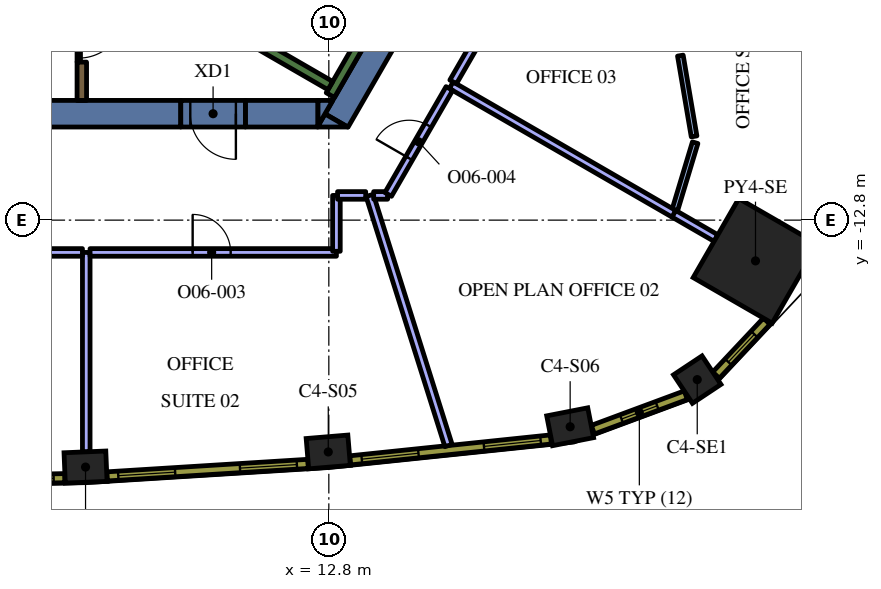
"""IFC4 building model, lengths in metres.
Left out: names, types, materials, properties, quantities, classifications, styles, units other than length and angle.
Written with IfcOpenShell. Run it as: python <this file> out.ifc"""

import sys

from ifc_helpers import new_model, si_unit, direction, frame, frame_2d, origin, origin_2d, place, context, subcontext, project, spatial, polyline, rectangle, outline, extrude, element, fill, save


model = new_model("IFC4")
c1 = context("Model", 3, precision=1e-05, world=origin(), true_north=direction((0.0, 1.0)))
c2 = subcontext(c1, "Body", "Model", "MODEL_VIEW")
j1 = project(units=[si_unit("LENGTHUNIT", "METRE"), si_unit("PLANEANGLEUNIT", "RADIAN")], contexts=[c1])
p1 = place(None, origin())
s1 = spatial("IfcSite", under=j1, at=p1, CompositionType="ELEMENT")
p2 = place(p1, origin())
s2 = spatial("IfcBuilding", under=s1, at=p2, CompositionType="ELEMENT")
p3 = place(p2, frame((0.0, 0.0, 210.0)))
s3 = spatial("IfcBuildingStorey", under=s2, at=p3, CompositionType="ELEMENT", Elevation=210.0)
p4 = place(p3, frame((24.027, -13.872, 0.0), z_axis=(0.0, 0.0, 1.0), x_axis=(0.866025403784, -0.5, 0.0)))
e1 = element("IfcColumn", 1, at=p4, inside=s3, PredefinedType="COLUMN", context=c2, shape_type="SweptSolid", body=[
    extrude(rectangle(XDim=2.4, YDim=2.4, at=origin_2d()), origin(), (0.0, 0.0, 1.0), 4.2),
])
for number, where, z_axis, x_axis in (
    (2, (6.398, -19.298, 0.0), (0.0, 0.0, 1.0), (0.999, 0.041, 0.0)),
    (3, (12.785, -18.9, 0.0), (0.0, 0.0, 1.0), (0.997, 0.083, 0.0)),
    (4, (19.15, -18.237, 0.0), (0.0, 0.0, 1.0), (0.981, 0.192, 0.0)),
):
    element("IfcColumn", number, at=place(p3, frame(where, z_axis=z_axis, x_axis=x_axis)), inside=s3, PredefinedType="COLUMN", context=c2, shape_type="SweptSolid", body=[
        extrude(rectangle(XDim=1.1, YDim=0.8, at=origin_2d()), origin(), (0.0, 0.0, 1.0), 4.2),
    ])
p5 = place(p3, frame((22.494, -16.997, 0.0), z_axis=(0.0, 0.0, 1.0), x_axis=(0.833238868178, 0.552913183563, 0.0)))
e5 = element("IfcColumn", 5, at=p5, inside=s3, PredefinedType="COLUMN", context=c2, shape_type="SweptSolid", body=[
    extrude(rectangle(XDim=0.9, YDim=0.9, at=origin_2d()), origin(), (0.0, 0.0, 1.0), 4.2),
])
p6 = place(p3, frame((13.003, -10.179, 0.0), z_axis=(0.0, 0.0, 1.0), x_axis=(0.499972675833, 0.866041178825, 0.0)))
e6 = element("IfcWall", 6, at=p6, inside=s3, PredefinedType="SOLIDWALL", context=c2, shape_type="SweptSolid", body=[
    extrude(rectangle(XDim=3.829, YDim=0.7, at=frame_2d((1.915, 0.0))), origin(), (0.0, 0.0, 1.0), 4.2),
])
p7 = place(p3, origin())
e7 = element("IfcWall", 7, at=p7, inside=s3, PredefinedType="SOLIDWALL", context=c2, shape_type="SweptSolid", body=[
    extrude(outline(polyline([(12.698, -10.005), (13.296, -10.35), (12.5, -10.35), (12.698, -10.005)])), origin(), (0.0, 0.0, 1.0), 4.2),
])
p8 = place(p3, frame((10.604, -10.0, 0.0), z_axis=(0.0, 0.0, 1.0), x_axis=(1.0, 0.0, 0.0)))
e8 = element("IfcWall", 8, at=p8, inside=s3, PredefinedType="SOLIDWALL", context=c2, shape_type="SweptSolid", body=[
    extrude(rectangle(XDim=1.909, YDim=0.7, at=frame_2d((0.955, 0.0))), origin(), (0.0, 0.0, 1.0), 4.2),
])
e9 = element("IfcWall", 9, at=p7, inside=s3, PredefinedType="SOLIDWALL", context=c2, shape_type="SweptSolid", body=[
    extrude(outline(polyline([(12.904, -9.65), (12.516, -10.322), (12.516, -9.65), (12.904, -9.65)])), origin(), (0.0, 0.0, 1.0), 4.2),
])
p9 = place(p3, frame((-10.556, -10.0, 0.0), z_axis=(0.0, 0.0, 1.0), x_axis=(1.0, 0.0, 0.0)))
e10 = element("IfcWall", 10, at=p9, inside=s3, PredefinedType="SOLIDWALL", context=c2, shape_type="SweptSolid", body=[
    extrude(rectangle(XDim=19.461, YDim=0.7, at=frame_2d((9.73, 0.0))), origin(), (0.0, 0.0, 1.0), 4.2),
])
p10 = place(p3, frame((12.84, -9.511, 0.0), z_axis=(0.0, 0.0, 1.0), x_axis=(0.500048121057, 0.865997619297, 0.0)))
e11 = element("IfcWall", 11, at=p10, inside=s3, PredefinedType="SOLIDWALL", context=c2, shape_type="SweptSolid", body=[
    extrude(rectangle(XDim=3.634, YDim=0.25, at=frame_2d((1.817, 0.0))), origin(), (0.0, 0.0, 1.0), 4.2),
])
p11 = place(p3, frame((12.84, -9.261, 0.0), z_axis=(0.0, 0.0, 1.0), x_axis=(-0.866013990052, 0.500019768644, 0.0)))
e12 = element("IfcWall", 12, at=p11, inside=s3, PredefinedType="SOLIDWALL", context=c2, shape_type="SweptSolid", body=[
    extrude(rectangle(XDim=6.8, YDim=0.25, at=frame_2d((3.4, 0.0))), origin(), (0.0, 0.0, 1.0), 4.2),
])
p12 = place(p3, frame((6.3, -9.65, 0.0), z_axis=(0.0, 0.0, 1.0), x_axis=(0.0, 1.0, 0.0)))
e13 = element("IfcWall", 13, at=p12, inside=s3, PredefinedType="SOLIDWALL", context=c2, shape_type="SweptSolid", body=[
    extrude(rectangle(XDim=1.008, YDim=0.25, at=frame_2d((0.504, 0.0))), origin(), (0.0, 0.0, 1.0), 4.2),
])
p13 = place(p3, frame((6.22, -7.237, 0.0), z_axis=(0.0, 0.0, 1.0), x_axis=(0.0, -1.0, 0.0)))
e14 = element("IfcWall", 14, at=p13, inside=s3, PredefinedType="PARTITIONING", context=c2, shape_type="SweptSolid", body=[
    extrude(rectangle(XDim=1.4, YDim=0.09, at=frame_2d((0.7, 0.0))), origin(), (0.0, 0.0, 1.0), 3.45),
])
p14 = place(p13, frame((0.1, 0.0, 0.0)))
e15 = element("IfcOpeningElement", 15, at=p14, cuts=e14, PredefinedType="OPENING", context=c2, shape_type="SweptSolid", body=[
    extrude(rectangle(XDim=1.2, YDim=2.1, at=frame_2d((0.6, 1.05))), frame((0.0, 0.055, 0.0), z_axis=(0.0, -1.0, 0.0), x_axis=(1.0, 0.0, 0.0)), (0.0, 0.0, 1.0), 0.11),
])
p15 = place(p3, frame((10.604, -10.0, 0.0), z_axis=(0.0, 0.0, 1.0), x_axis=(-1.0, 0.0, 0.0)))
e16 = element("IfcWall", 16, at=p15, inside=s3, PredefinedType="SOLIDWALL", context=c2, shape_type="SweptSolid", body=[
    extrude(rectangle(XDim=1.7, YDim=0.7, at=frame_2d((0.85, 0.0))), origin(), (0.0, 0.0, 1.0), 4.2),
])
p16 = place(p15, frame((0.25, 0.0, 0.0)))
e17 = element("IfcOpeningElement", 17, at=p16, cuts=e16, PredefinedType="OPENING", context=c2, shape_type="SweptSolid", body=[
    extrude(rectangle(XDim=1.2, YDim=2.1, at=frame_2d((0.6, 1.05))), frame((0.0, 0.36, 0.0), z_axis=(0.0, -1.0, 0.0), x_axis=(1.0, 0.0, 0.0)), (0.0, 0.0, 1.0), 0.72),
])
p17 = place(p3, frame((6.417, -13.65, 0.0), z_axis=(0.0, 0.0, 1.0), x_axis=(0.0, -1.0, 0.0)))
e18 = element("IfcWall", 18, at=p17, inside=s3, PredefinedType="PARTITIONING", context=c2, shape_type="SweptSolid", body=[
    extrude(rectangle(XDim=5.247, YDim=0.2, at=frame_2d((2.624, 0.0))), origin(), (0.0, 0.0, 1.0), 3.45),
])
p18 = place(p3, frame((-6.317, -13.65, 0.0), z_axis=(0.0, 0.0, 1.0), x_axis=(1.0, 0.0, 0.0)))
e19 = element("IfcWall", 19, at=p18, inside=s3, PredefinedType="PARTITIONING", context=c2, shape_type="SweptSolid", body=[
    extrude(rectangle(XDim=12.634, YDim=0.2, at=frame_2d((6.317, 0.0))), origin(), (0.0, 0.0, 1.0), 3.45),
])
p19 = place(p18, frame((5.8, 0.0, 0.0)))
e20 = element("IfcOpeningElement", 20, at=p19, cuts=e19, PredefinedType="OPENING", context=c2, shape_type="SweptSolid", body=[
    extrude(rectangle(XDim=1.0, YDim=2.1, at=frame_2d((0.5, 1.05))), frame((0.0, 0.11, 0.0), z_axis=(0.0, -1.0, 0.0), x_axis=(1.0, 0.0, 0.0)), (0.0, 0.0, 1.0), 0.22),
])
p20 = place(p3, frame((13.875, -12.15, 0.0), z_axis=(0.0, 0.0, 1.0), x_axis=(0.3005606746, -0.953762696316, 0.0)))
e21 = element("IfcWall", 21, at=p20, inside=s3, PredefinedType="PARTITIONING", context=c2, shape_type="SweptSolid", body=[
    extrude(rectangle(XDim=6.9, YDim=0.2, at=frame_2d((3.45, 0.0))), origin(), (0.0, 0.0, 1.0), 3.45),
])
p21 = place(p3, frame((6.517, -13.65, 0.0), z_axis=(0.0, 0.0, 1.0), x_axis=(1.0, 0.0, 0.0)))
e22 = element("IfcWall", 22, at=p21, inside=s3, PredefinedType="PARTITIONING", context=c2, shape_type="SweptSolid", body=[
    extrude(rectangle(XDim=6.483, YDim=0.2, at=frame_2d((3.242, 0.0))), origin(), (0.0, 0.0, 1.0), 3.45),
])
p22 = place(p21, frame((2.7, 0.0, 0.0)))
e23 = element("IfcOpeningElement", 23, at=p22, cuts=e22, PredefinedType="OPENING", context=c2, shape_type="SweptSolid", body=[
    extrude(rectangle(XDim=1.0, YDim=2.1, at=frame_2d((0.5, 1.05))), frame((0.0, 0.11, 0.0), z_axis=(0.0, -1.0, 0.0), x_axis=(1.0, 0.0, 0.0)), (0.0, 0.0, 1.0), 0.22),
])
p23 = place(p3, frame((13.0, -13.62, 0.0), z_axis=(0.0, 0.0, 1.0), x_axis=(0.0, 1.0, 0.0)))
e24 = element("IfcWall", 24, at=p23, inside=s3, PredefinedType="PARTITIONING", context=c2, shape_type="SweptSolid", body=[
    extrude(rectangle(XDim=1.47, YDim=0.2, at=frame_2d((0.735, 0.0))), origin(), (0.0, 0.0, 1.0), 3.45),
])
p24 = place(p3, frame((13.03, -12.15, 0.0), z_axis=(0.0, 0.0, 1.0), x_axis=(1.0, 0.0, 0.0)))
e25 = element("IfcWall", 25, at=p24, inside=s3, PredefinedType="PARTITIONING", context=c2, shape_type="SweptSolid", body=[
    extrude(rectangle(XDim=0.74, YDim=0.2, at=frame_2d((0.37, 0.0))), origin(), (0.0, 0.0, 1.0), 3.45),
])
p25 = place(p3, frame((21.873, -12.628, 0.0), z_axis=(0.0, 0.0, 1.0), x_axis=(0.866052988967, -0.499952218018, 0.0)))
e26 = element("IfcWall", 26, at=p25, inside=s3, PredefinedType="PARTITIONING", context=c2, shape_type="SweptSolid", body=[
    extrude(rectangle(XDim=1.288, YDim=0.2, at=frame_2d((0.644, 0.0))), origin(), (0.0, 0.0, 1.0), 3.45),
])
p26 = place(p3, frame((16.021, -9.25, 0.0), z_axis=(0.0, 0.0, 1.0), x_axis=(0.86602692059, -0.499997372806, 0.0)))
e27 = element("IfcWall", 27, at=p26, inside=s3, PredefinedType="PARTITIONING", context=c2, shape_type="SweptSolid", body=[
    extrude(rectangle(XDim=6.765, YDim=0.2, at=frame_2d((3.382, 0.0))), origin(), (0.0, 0.0, 1.0), 3.45),
])
p27 = place(p3, frame((13.98, -12.15, 0.0), z_axis=(0.0, 0.0, 1.0), x_axis=(1.0, 0.0, 0.0)))
e28 = element("IfcWall", 28, at=p27, inside=s3, PredefinedType="PARTITIONING", context=c2, shape_type="SweptSolid", body=[
    extrude(rectangle(XDim=0.367, YDim=0.2, at=frame_2d((0.184, 0.0))), origin(), (0.0, 0.0, 1.0), 3.45),
])
p28 = place(p3, frame((14.362, -12.124, 0.0), z_axis=(0.0, 0.0, 1.0), x_axis=(0.500022299258, 0.866012528919, 0.0)))
e29 = element("IfcWall", 29, at=p28, inside=s3, PredefinedType="PARTITIONING", context=c2, shape_type="SweptSolid", body=[
    extrude(rectangle(XDim=3.219, YDim=0.2, at=frame_2d((1.609, 0.0))), origin(), (0.0, 0.0, 1.0), 3.45),
])
p29 = place(p28, frame((1.1, 0.0, 0.0)))
e30 = element("IfcOpeningElement", 30, at=p29, cuts=e29, PredefinedType="OPENING", context=c2, shape_type="SweptSolid", body=[
    extrude(rectangle(XDim=1.0, YDim=2.1, at=frame_2d((0.5, 1.05))), frame((0.0, 0.11, 0.0), z_axis=(0.0, -1.0, 0.0), x_axis=(1.0, 0.0, 0.0)), (0.0, 0.0, 1.0), 0.22),
])
p30 = place(p3, frame((21.906, -12.532, 0.0), z_axis=(0.0, 0.0, 1.0), x_axis=(0.288789848591, 0.957392512688, 0.0)))
e31 = element("IfcWall", 31, at=p30, inside=s3, PredefinedType="PARTITIONING", context=c2, shape_type="SweptSolid", body=[
    extrude(rectangle(XDim=1.848, YDim=0.15, at=frame_2d((0.924, 0.0))), origin(), (0.0, 0.0, 1.0), 3.45),
])
p31 = place(p3, frame((22.412, -10.597, 0.0), z_axis=(0.0, 0.0, 1.0), x_axis=(-0.167612004459, 0.985853039738, 0.0)))
e32 = element("IfcWall", 32, at=p31, inside=s3, PredefinedType="PARTITIONING", context=c2, shape_type="SweptSolid", body=[
    extrude(rectangle(XDim=2.156, YDim=0.15, at=frame_2d((1.078, 0.0))), origin(), (0.0, 0.0, 1.0), 3.45),
])
p32 = place(p3, frame((16.072, -9.163, 0.0), z_axis=(0.0, 0.0, 1.0), x_axis=(0.500010870188, 0.866019127788, 0.0)))
e33 = element("IfcWall", 33, at=p32, inside=s3, PredefinedType="PARTITIONING", context=c2, shape_type="SweptSolid", body=[
    extrude(rectangle(XDim=3.249, YDim=0.2, at=frame_2d((1.624, 0.0))), origin(), (0.0, 0.0, 1.0), 3.45),
])
p33 = place(p3, frame((0.556, -19.699, 0.0), z_axis=(0.0, 0.0, 1.0), x_axis=(0.999784035184, 0.020781794712, 0.0)))
e34 = element("IfcWall", 34, at=p33, inside=s3, PredefinedType="SOLIDWALL", context=c2, shape_type="SweptSolid", body=[
    extrude(rectangle(XDim=5.298, YDim=0.24, at=frame_2d((2.649, 0.0))), origin(), (0.0, 0.0, 1.0), 3.95),
])
p34 = place(p33, frame((0.294, 0.0, 0.9)))
e35 = element("IfcOpeningElement", 35, at=p34, cuts=e34, PredefinedType="OPENING", context=c2, shape_type="SweptSolid", body=[
    extrude(rectangle(XDim=1.5, YDim=2.55, at=frame_2d((0.75, 1.275))), frame((0.0, 0.13, 0.0), z_axis=(0.0, -1.0, 0.0), x_axis=(1.0, 0.0, 0.0)), (0.0, 0.0, 1.0), 0.26),
])
p35 = place(p33, frame((3.504, 0.0, 0.9)))
e36 = element("IfcOpeningElement", 36, at=p35, cuts=e34, PredefinedType="OPENING", context=c2, shape_type="SweptSolid", body=[
    extrude(rectangle(XDim=1.5, YDim=2.55, at=frame_2d((0.75, 1.275))), frame((0.0, 0.13, 0.0), z_axis=(0.0, -1.0, 0.0), x_axis=(1.0, 0.0, 0.0)), (0.0, 0.0, 1.0), 0.26),
])
p36 = place(p3, frame((6.965, -19.543, 0.0), z_axis=(0.0, 0.0, 1.0), x_axis=(0.9980633213, 0.062206162685, 0.0)))
e37 = element("IfcWall", 37, at=p36, inside=s3, PredefinedType="SOLIDWALL", context=c2, shape_type="SweptSolid", body=[
    extrude(rectangle(XDim=5.298, YDim=0.24, at=frame_2d((2.649, 0.0))), origin(), (0.0, 0.0, 1.0), 3.95),
])
p37 = place(p36, frame((0.295, 0.0, 0.9)))
e38 = element("IfcOpeningElement", 38, at=p37, cuts=e37, PredefinedType="OPENING", context=c2, shape_type="SweptSolid", body=[
    extrude(rectangle(XDim=1.5, YDim=2.55, at=frame_2d((0.75, 1.275))), frame((0.0, 0.13, 0.0), z_axis=(0.0, -1.0, 0.0), x_axis=(1.0, 0.0, 0.0)), (0.0, 0.0, 1.0), 0.26),
])
p38 = place(p36, frame((3.504, 0.0, 0.9)))
e39 = element("IfcOpeningElement", 39, at=p38, cuts=e37, PredefinedType="OPENING", context=c2, shape_type="SweptSolid", body=[
    extrude(rectangle(XDim=1.5, YDim=2.55, at=frame_2d((0.75, 1.275))), frame((0.0, 0.13, 0.0), z_axis=(0.0, -1.0, 0.0), x_axis=(1.0, 0.0, 0.0)), (0.0, 0.0, 1.0), 0.26),
])
p39 = place(p3, frame((13.362, -19.121, 0.0), z_axis=(0.0, 0.0, 1.0), x_axis=(0.994621961215, 0.103571976272, 0.0)))
e40 = element("IfcWall", 40, at=p39, inside=s3, PredefinedType="SOLIDWALL", context=c2, shape_type="SweptSolid", body=[
    extrude(rectangle(XDim=5.311, YDim=0.24, at=frame_2d((2.655, 0.0))), origin(), (0.0, 0.0, 1.0), 3.95),
])
p40 = place(p39, frame((0.306, 0.0, 0.9)))
e41 = element("IfcOpeningElement", 41, at=p40, cuts=e40, PredefinedType="OPENING", context=c2, shape_type="SweptSolid", body=[
    extrude(rectangle(XDim=1.5, YDim=2.55, at=frame_2d((0.75, 1.275))), frame((0.0, 0.13, 0.0), z_axis=(0.0, -1.0, 0.0), x_axis=(1.0, 0.0, 0.0)), (0.0, 0.0, 1.0), 0.26),
])
p41 = place(p39, frame((3.539, 0.0, 0.9)))
e42 = element("IfcOpeningElement", 42, at=p41, cuts=e40, PredefinedType="OPENING", context=c2, shape_type="SweptSolid", body=[
    extrude(rectangle(XDim=1.5, YDim=2.55, at=frame_2d((0.75, 1.275))), frame((0.0, 0.13, 0.0), z_axis=(0.0, -1.0, 0.0), x_axis=(1.0, 0.0, 0.0)), (0.0, 0.0, 1.0), 0.26),
])
p42 = place(p3, frame((19.748, -18.314, 0.0), z_axis=(0.0, 0.0, 1.0), x_axis=(0.937569171184, 0.347798863203, 0.0)))
e43 = element("IfcWall", 43, at=p42, inside=s3, PredefinedType="SOLIDWALL", context=c2, shape_type="SweptSolid", body=[
    extrude(rectangle(XDim=2.609, YDim=0.24, at=frame_2d((1.305, 0.0))), origin(), (0.0, 0.0, 1.0), 3.95),
])
p43 = place(p42, frame((0.805, 0.0, 0.9)))
e44 = element("IfcOpeningElement", 44, at=p43, cuts=e43, PredefinedType="OPENING", context=c2, shape_type="SweptSolid", body=[
    extrude(rectangle(XDim=1.0, YDim=2.55, at=frame_2d((0.5, 1.275))), frame((0.0, 0.13, 0.0), z_axis=(0.0, -1.0, 0.0), x_axis=(1.0, 0.0, 0.0)), (0.0, 0.0, 1.0), 0.26),
])
p44 = place(p3, frame((22.989, -16.879, 0.0), z_axis=(0.0, 0.0, 1.0), x_axis=(0.684770274166, 0.728758994194, 0.0)))
e45 = element("IfcWall", 45, at=p44, inside=s3, PredefinedType="SOLIDWALL", context=c2, shape_type="SweptSolid", body=[
    extrude(rectangle(XDim=1.948, YDim=0.24, at=frame_2d((0.974, 0.0))), origin(), (0.0, 0.0, 1.0), 3.95),
])
p45 = place(p44, frame((0.474, 0.0, 0.9)))
e46 = element("IfcOpeningElement", 46, at=p45, cuts=e45, PredefinedType="OPENING", context=c2, shape_type="SweptSolid", body=[
    extrude(rectangle(XDim=1.0, YDim=2.55, at=frame_2d((0.5, 1.275))), frame((0.0, 0.13, 0.0), z_axis=(0.0, -1.0, 0.0), x_axis=(1.0, 0.0, 0.0)), (0.0, 0.0, 1.0), 0.26),
])
p46 = place(p14, origin())
e47 = element("IfcDoor", 47, at=p46, inside=s3, OperationType="SINGLE_SWING_LEFT", PredefinedType="DOOR", context=c2, shape_type="SweptSolid", body=[
    extrude(rectangle(XDim=1.2, YDim=2.1, at=frame_2d((0.6, 1.05))), frame((0.0, 0.025, 0.0), z_axis=(0.0, -1.0, 0.0), x_axis=(1.0, 0.0, 0.0)), (0.0, 0.0, 1.0), 0.05),
])
fill(e15, e47)
p47 = place(p16, origin())
e48 = element("IfcDoor", 48, at=p47, inside=s3, OperationType="SINGLE_SWING_LEFT", PredefinedType="DOOR", context=c2, shape_type="SweptSolid", body=[
    extrude(rectangle(XDim=1.2, YDim=2.1, at=frame_2d((0.6, 1.05))), frame((0.0, 0.025, 0.0), z_axis=(0.0, -1.0, 0.0), x_axis=(1.0, 0.0, 0.0)), (0.0, 0.0, 1.0), 0.05),
])
fill(e17, e48)
p48 = place(p22, origin())
e49 = element("IfcDoor", 49, at=p48, inside=s3, OperationType="SINGLE_SWING_LEFT", PredefinedType="DOOR", context=c2, shape_type="SweptSolid", body=[
    extrude(rectangle(XDim=1.0, YDim=2.1, at=frame_2d((0.5, 1.05))), frame((0.0, 0.025, 0.0), z_axis=(0.0, -1.0, 0.0), x_axis=(1.0, 0.0, 0.0)), (0.0, 0.0, 1.0), 0.05),
])
fill(e23, e49)
p49 = place(p29, origin())
e50 = element("IfcDoor", 50, at=p49, inside=s3, OperationType="SINGLE_SWING_LEFT", PredefinedType="DOOR", context=c2, shape_type="SweptSolid", body=[
    extrude(rectangle(XDim=1.0, YDim=2.1, at=frame_2d((0.5, 1.05))), frame((0.0, 0.025, 0.0), z_axis=(0.0, -1.0, 0.0), x_axis=(1.0, 0.0, 0.0)), (0.0, 0.0, 1.0), 0.05),
])
fill(e30, e50)
p50 = place(p35, origin())
e51 = element("IfcWindow", 51, at=p50, inside=s3, PartitioningType="SINGLE_PANEL", PredefinedType="WINDOW", context=c2, shape_type="SweptSolid", body=[
    extrude(rectangle(XDim=1.5, YDim=2.55, at=frame_2d((0.75, 1.275))), frame((0.0, 0.04, 0.0), z_axis=(0.0, -1.0, 0.0), x_axis=(1.0, 0.0, 0.0)), (0.0, 0.0, 1.0), 0.06),
])
fill(e36, e51)
p51 = place(p37, origin())
e52 = element("IfcWindow", 52, at=p51, inside=s3, PartitioningType="SINGLE_PANEL", PredefinedType="WINDOW", context=c2, shape_type="SweptSolid", body=[
    extrude(rectangle(XDim=1.5, YDim=2.55, at=frame_2d((0.75, 1.275))), frame((0.0, 0.04, 0.0), z_axis=(0.0, -1.0, 0.0), x_axis=(1.0, 0.0, 0.0)), (0.0, 0.0, 1.0), 0.06),
])
fill(e38, e52)
p52 = place(p38, origin())
e53 = element("IfcWindow", 53, at=p52, inside=s3, PartitioningType="SINGLE_PANEL", PredefinedType="WINDOW", context=c2, shape_type="SweptSolid", body=[
    extrude(rectangle(XDim=1.5, YDim=2.55, at=frame_2d((0.75, 1.275))), frame((0.0, 0.04, 0.0), z_axis=(0.0, -1.0, 0.0), x_axis=(1.0, 0.0, 0.0)), (0.0, 0.0, 1.0), 0.06),
])
fill(e39, e53)
p53 = place(p40, origin())
e54 = element("IfcWindow", 54, at=p53, inside=s3, PartitioningType="SINGLE_PANEL", PredefinedType="WINDOW", context=c2, shape_type="SweptSolid", body=[
    extrude(rectangle(XDim=1.5, YDim=2.55, at=frame_2d((0.75, 1.275))), frame((0.0, 0.04, 0.0), z_axis=(0.0, -1.0, 0.0), x_axis=(1.0, 0.0, 0.0)), (0.0, 0.0, 1.0), 0.06),
])
fill(e41, e54)
p54 = place(p41, origin())
e55 = element("IfcWindow", 55, at=p54, inside=s3, PartitioningType="SINGLE_PANEL", PredefinedType="WINDOW", context=c2, shape_type="SweptSolid", body=[
    extrude(rectangle(XDim=1.5, YDim=2.55, at=frame_2d((0.75, 1.275))), frame((0.0, 0.04, 0.0), z_axis=(0.0, -1.0, 0.0), x_axis=(1.0, 0.0, 0.0)), (0.0, 0.0, 1.0), 0.06),
])
fill(e42, e55)
p55 = place(p43, origin())
e56 = element("IfcWindow", 56, at=p55, inside=s3, PartitioningType="SINGLE_PANEL", PredefinedType="WINDOW", context=c2, shape_type="SweptSolid", body=[
    extrude(rectangle(XDim=1.0, YDim=2.55, at=frame_2d((0.5, 1.275))), frame((0.0, 0.04, 0.0), z_axis=(0.0, -1.0, 0.0), x_axis=(1.0, 0.0, 0.0)), (0.0, 0.0, 1.0), 0.06),
])
fill(e44, e56)
p56 = place(p45, origin())
e57 = element("IfcWindow", 57, at=p56, inside=s3, PartitioningType="SINGLE_PANEL", PredefinedType="WINDOW", context=c2, shape_type="SweptSolid", body=[
    extrude(rectangle(XDim=1.0, YDim=2.55, at=frame_2d((0.5, 1.275))), frame((0.0, 0.04, 0.0), z_axis=(0.0, -1.0, 0.0), x_axis=(1.0, 0.0, 0.0)), (0.0, 0.0, 1.0), 0.06),
])
fill(e46, e57)
save(model, sys.argv[1])
